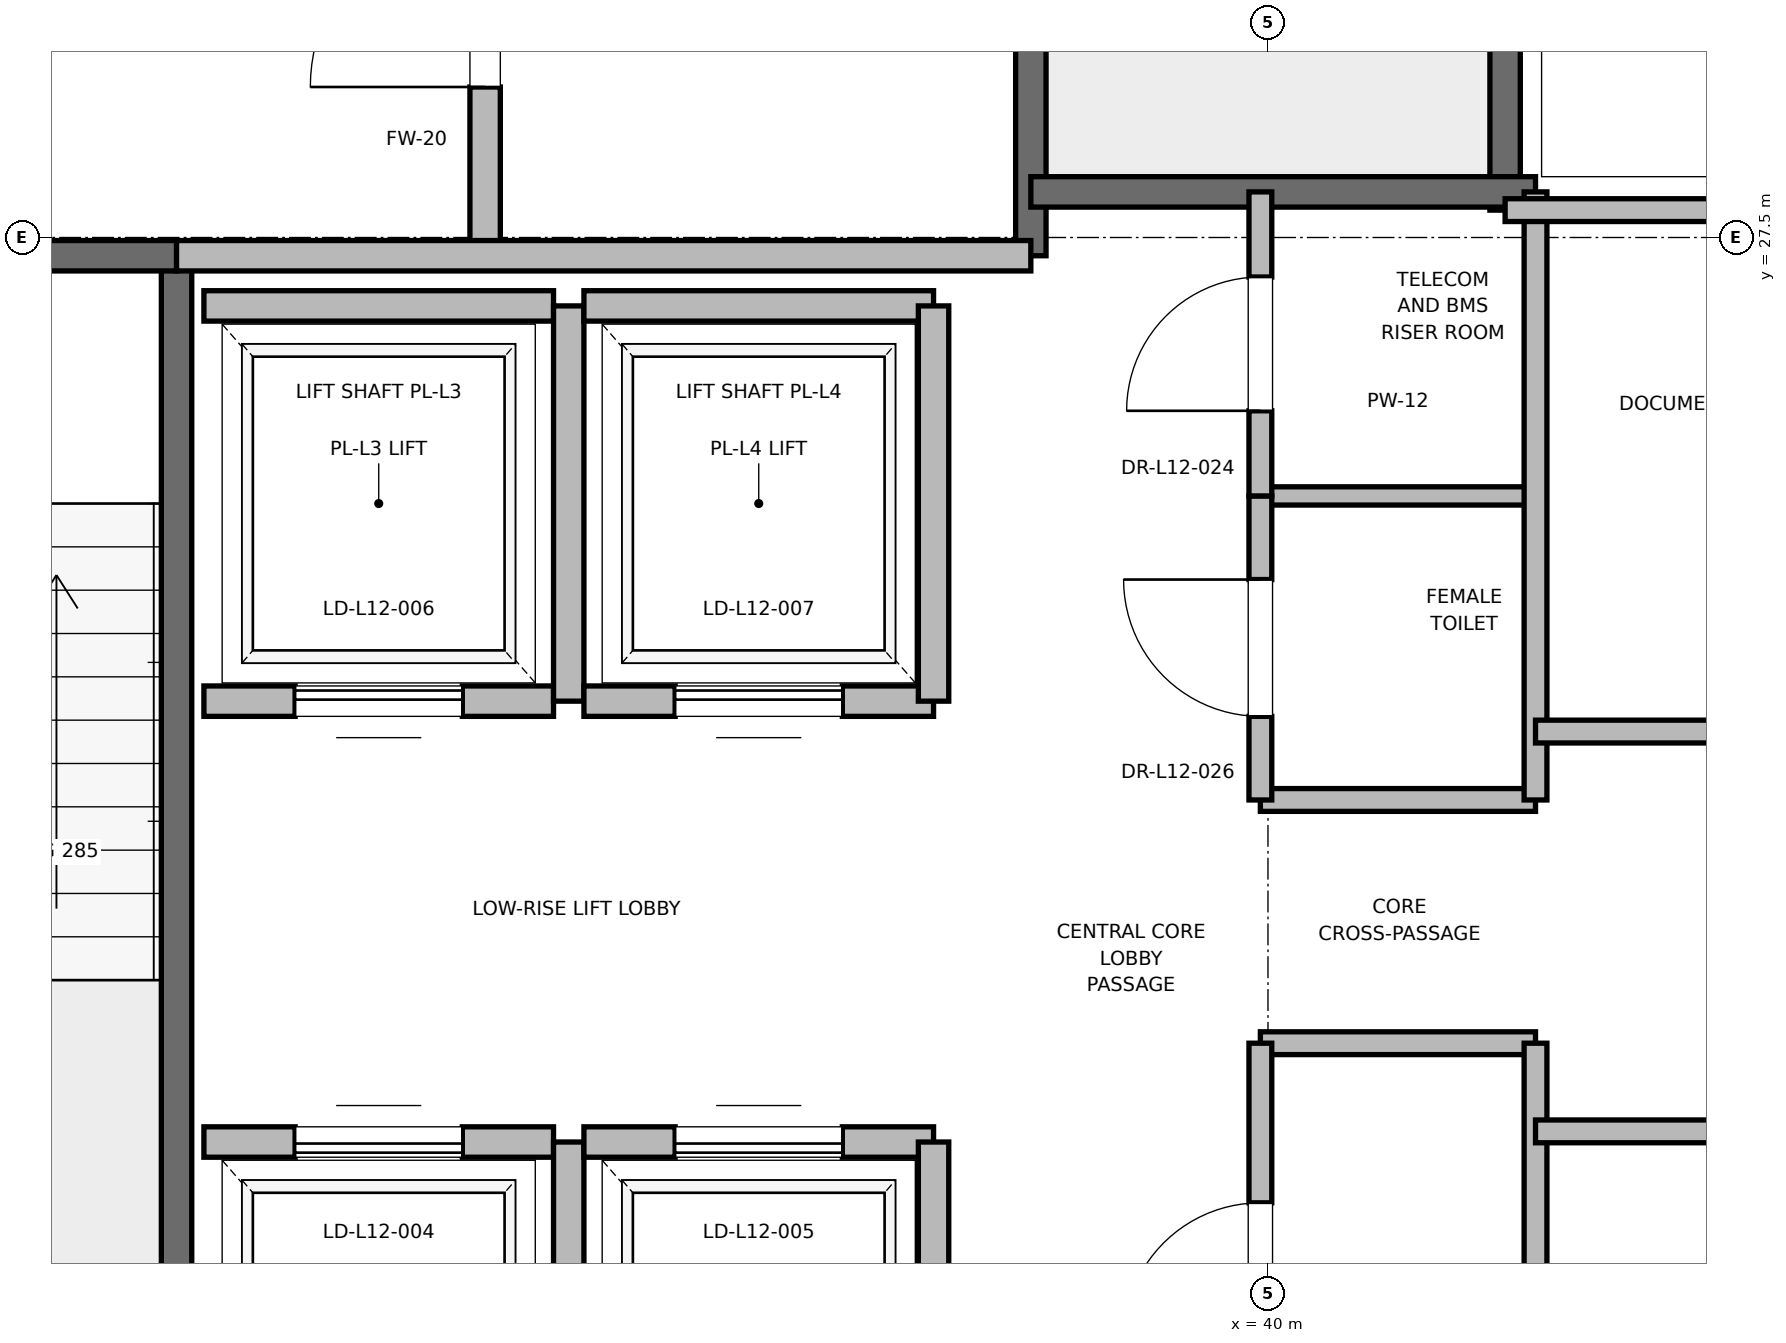
"""IFC4 building model, lengths in metres.
Left out: names, types, materials, properties, quantities, classifications, styles, units other than length and angle.
Written with IfcOpenShell. Run it as: python <this file> out.ifc"""

import sys

from ifc_helpers import new_model, si_unit, direction, frame, frame_2d, origin, place, context, subcontext, project, spatial, rectangle, extrude, element, fill, save


model = new_model("IFC4")
c1 = context("Model", 3, precision=1e-05, world=origin(), true_north=direction((0.0, 1.0)))
c2 = subcontext(c1, "Body", "Model", "MODEL_VIEW")
j1 = project(units=[si_unit("LENGTHUNIT", "METRE"), si_unit("PLANEANGLEUNIT", "RADIAN")], contexts=[c1])
p1 = place(None, origin())
s1 = spatial("IfcSite", under=j1, at=p1, CompositionType="ELEMENT")
p2 = place(p1, origin())
s2 = spatial("IfcBuilding", under=s1, at=p2, CompositionType="ELEMENT")
p3 = place(p2, frame((0.0, 0.0, 55.6)))
s3 = spatial("IfcBuildingStorey", under=s2, at=p3, CompositionType="ELEMENT", Elevation=55.6)
p4 = place(p3, frame((32.82, 18.6, 0.0), z_axis=(0.0, 0.0, 1.0), x_axis=(0.0, 1.0, 0.0)))
e1 = element("IfcWall", 1, at=p4, inside=s3, PredefinedType="SOLIDWALL", context=c2, shape_type="SweptSolid", body=[
    extrude(rectangle(XDim=8.78, YDim=0.2, at=frame_2d((4.39, 0.0))), origin(), (0.0, 0.0, 1.0), 3.76),
])
p5 = place(p3, frame((29.7, 27.38, 0.0), z_axis=(0.0, 0.0, 1.0), x_axis=(1.0, 0.0, 0.0)))
e2 = element("IfcWall", 2, at=p5, inside=s3, PredefinedType="SOLIDWALL", context=c2, shape_type="SweptSolid", body=[
    extrude(rectangle(XDim=3.12, YDim=0.2, at=frame_2d((1.56, 0.0))), origin(), (0.0, 0.0, 1.0), 3.76),
])
p6 = place(p5, frame((1.01, 0.0, 0.0)))
e3 = element("IfcOpeningElement", 3, at=p6, cuts=e2, PredefinedType="OPENING", context=c2, shape_type="SweptSolid", body=[
    extrude(rectangle(XDim=1.1, YDim=2.15, at=frame_2d((0.55, 1.075))), frame((0.0, 0.1, 0.0), z_axis=(0.0, -1.0, 0.0), x_axis=(1.0, 0.0, 0.0)), (0.0, 0.0, 1.0), 0.2),
])
p7 = place(p3, frame((38.44, 27.38, 0.0), z_axis=(0.0, 0.0, 1.0), x_axis=(0.0, 1.0, 0.0)))
e4 = element("IfcWall", 4, at=p7, inside=s3, PredefinedType="SOLIDWALL", context=c2, shape_type="SweptSolid", body=[
    extrude(rectangle(XDim=8.87, YDim=0.2, at=frame_2d((4.435, 0.0))), origin(), (0.0, 0.0, 1.0), 3.76),
])
p8 = place(p3, frame((41.56, 27.68, 0.0), z_axis=(0.0, 0.0, 1.0), x_axis=(0.0, 1.0, 0.0)))
e5 = element("IfcWall", 5, at=p8, inside=s3, PredefinedType="SOLIDWALL", context=c2, shape_type="SweptSolid", body=[
    extrude(rectangle(XDim=8.57, YDim=0.2, at=frame_2d((4.285, 0.0))), origin(), (0.0, 0.0, 1.0), 3.76),
])
p9 = place(p3, frame((38.44, 27.8, 0.0), z_axis=(0.0, 0.0, 1.0), x_axis=(1.0, 0.0, 0.0)))
e6 = element("IfcWall", 6, at=p9, inside=s3, PredefinedType="SOLIDWALL", context=c2, shape_type="SweptSolid", body=[
    extrude(rectangle(XDim=3.32, YDim=0.2, at=frame_2d((1.66, 0.0))), origin(), (0.0, 0.0, 1.0), 3.76),
])
p10 = place(p3, frame((34.85, 27.38, 0.0), z_axis=(0.0, 0.0, 1.0), x_axis=(0.0, 1.0, 0.0)))
e7 = element("IfcWall", 7, at=p10, inside=s3, PredefinedType="PARTITIONING", context=c2, shape_type="SweptSolid", body=[
    extrude(rectangle(XDim=3.37, YDim=0.2, at=frame_2d((1.685, 0.0))), origin(), (0.0, 0.0, 1.0), 3.76),
])
p11 = place(p10, frame((1.11, 0.0, 0.0)))
e8 = element("IfcOpeningElement", 8, at=p11, cuts=e7, PredefinedType="OPENING", context=c2, shape_type="SweptSolid", body=[
    extrude(rectangle(XDim=1.15, YDim=2.2, at=frame_2d((0.575, 1.1))), frame((0.0, 0.1, 0.0), z_axis=(0.0, -1.0, 0.0), x_axis=(1.0, 0.0, 0.0)), (0.0, 0.0, 1.0), 0.2),
])
p12 = place(p3, frame((32.82, 27.38, 0.0), z_axis=(0.0, 0.0, 1.0), x_axis=(1.0, 0.0, 0.0)))
e9 = element("IfcWall", 9, at=p12, inside=s3, PredefinedType="PARTITIONING", context=c2, shape_type="SweptSolid", body=[
    extrude(rectangle(XDim=5.62, YDim=0.2, at=frame_2d((2.81, 0.0))), origin(), (0.0, 0.0, 1.0), 3.76),
])
p13 = place(p3, frame((35.3, 21.55, 0.0), z_axis=(0.0, 0.0, 1.0), x_axis=(-1.0, 0.0, 0.0)))
e10 = element("IfcWall", 10, at=p13, inside=s3, PredefinedType="SOLIDWALL", context=c2, shape_type="SweptSolid", body=[
    extrude(rectangle(XDim=2.3, YDim=0.2, at=frame_2d((1.15, 0.0))), origin(), (0.0, 0.0, 1.0), 3.76),
])
p14 = place(p13, frame((0.6, 0.0, 0.0)))
e11 = element("IfcOpeningElement", 11, at=p14, cuts=e10, PredefinedType="OPENING", context=c2, shape_type="SweptSolid", body=[
    extrude(rectangle(XDim=1.1, YDim=2.2, at=frame_2d((0.55, 1.1))), frame((0.0, 0.1, 0.0), z_axis=(0.0, -1.0, 0.0), x_axis=(1.0, 0.0, 0.0)), (0.0, 0.0, 1.0), 0.2),
])
p15 = place(p3, frame((35.4, 18.95, 0.0), z_axis=(0.0, 0.0, 1.0), x_axis=(0.0, 1.0, 0.0)))
e12 = element("IfcWall", 12, at=p15, inside=s3, PredefinedType="SOLIDWALL", context=c2, shape_type="SweptSolid", body=[
    extrude(rectangle(XDim=2.6, YDim=0.2, at=frame_2d((1.3, 0.0))), origin(), (0.0, 0.0, 1.0), 3.76),
])
p16 = place(p3, frame((37.8, 21.55, 0.0), z_axis=(0.0, 0.0, 1.0), x_axis=(-1.0, 0.0, 0.0)))
e13 = element("IfcWall", 13, at=p16, inside=s3, PredefinedType="SOLIDWALL", context=c2, shape_type="SweptSolid", body=[
    extrude(rectangle(XDim=2.3, YDim=0.2, at=frame_2d((1.15, 0.0))), origin(), (0.0, 0.0, 1.0), 3.76),
])
p17 = place(p16, frame((0.6, 0.0, 0.0)))
e14 = element("IfcOpeningElement", 14, at=p17, cuts=e13, PredefinedType="OPENING", context=c2, shape_type="SweptSolid", body=[
    extrude(rectangle(XDim=1.1, YDim=2.2, at=frame_2d((0.55, 1.1))), frame((0.0, 0.1, 0.0), z_axis=(0.0, -1.0, 0.0), x_axis=(1.0, 0.0, 0.0)), (0.0, 0.0, 1.0), 0.2),
])
p18 = place(p3, frame((37.8, 18.95, 0.0), z_axis=(0.0, 0.0, 1.0), x_axis=(0.0, 1.0, 0.0)))
e15 = element("IfcWall", 15, at=p18, inside=s3, PredefinedType="SOLIDWALL", context=c2, shape_type="SweptSolid", body=[
    extrude(rectangle(XDim=2.6, YDim=0.2, at=frame_2d((1.3, 0.0))), origin(), (0.0, 0.0, 1.0), 2.54),
])
p19 = place(p3, frame((33.0, 24.45, 0.0), z_axis=(0.0, 0.0, 1.0), x_axis=(1.0, 0.0, 0.0)))
e16 = element("IfcWall", 16, at=p19, inside=s3, PredefinedType="SOLIDWALL", context=c2, shape_type="SweptSolid", body=[
    extrude(rectangle(XDim=2.3, YDim=0.2, at=frame_2d((1.15, 0.0))), origin(), (0.0, 0.0, 1.0), 3.76),
])
p20 = place(p19, frame((0.6, 0.0, 0.0)))
e17 = element("IfcOpeningElement", 17, at=p20, cuts=e16, PredefinedType="OPENING", context=c2, shape_type="SweptSolid", body=[
    extrude(rectangle(XDim=1.1, YDim=2.2, at=frame_2d((0.55, 1.1))), frame((0.0, 0.1, 0.0), z_axis=(0.0, -1.0, 0.0), x_axis=(1.0, 0.0, 0.0)), (0.0, 0.0, 1.0), 0.2),
])
p21 = place(p3, frame((35.3, 27.05, 0.0), z_axis=(0.0, 0.0, 1.0), x_axis=(-1.0, 0.0, 0.0)))
e18 = element("IfcWall", 18, at=p21, inside=s3, PredefinedType="SOLIDWALL", context=c2, shape_type="SweptSolid", body=[
    extrude(rectangle(XDim=2.3, YDim=0.2, at=frame_2d((1.15, 0.0))), origin(), (0.0, 0.0, 1.0), 3.76),
])
p22 = place(p3, frame((35.4, 24.45, 0.0), z_axis=(0.0, 0.0, 1.0), x_axis=(0.0, 1.0, 0.0)))
e19 = element("IfcWall", 19, at=p22, inside=s3, PredefinedType="SOLIDWALL", context=c2, shape_type="SweptSolid", body=[
    extrude(rectangle(XDim=2.6, YDim=0.2, at=frame_2d((1.3, 0.0))), origin(), (0.0, 0.0, 1.0), 3.76),
])
p23 = place(p3, frame((35.5, 24.45, 0.0), z_axis=(0.0, 0.0, 1.0), x_axis=(1.0, 0.0, 0.0)))
e20 = element("IfcWall", 20, at=p23, inside=s3, PredefinedType="SOLIDWALL", context=c2, shape_type="SweptSolid", body=[
    extrude(rectangle(XDim=2.3, YDim=0.2, at=frame_2d((1.15, 0.0))), origin(), (0.0, 0.0, 1.0), 3.76),
])
p24 = place(p23, frame((0.6, 0.0, 0.0)))
e21 = element("IfcOpeningElement", 21, at=p24, cuts=e20, PredefinedType="OPENING", context=c2, shape_type="SweptSolid", body=[
    extrude(rectangle(XDim=1.1, YDim=2.2, at=frame_2d((0.55, 1.1))), frame((0.0, 0.1, 0.0), z_axis=(0.0, -1.0, 0.0), x_axis=(1.0, 0.0, 0.0)), (0.0, 0.0, 1.0), 0.2),
])
p25 = place(p3, frame((37.8, 27.05, 0.0), z_axis=(0.0, 0.0, 1.0), x_axis=(-1.0, 0.0, 0.0)))
e22 = element("IfcWall", 22, at=p25, inside=s3, PredefinedType="SOLIDWALL", context=c2, shape_type="SweptSolid", body=[
    extrude(rectangle(XDim=2.3, YDim=0.2, at=frame_2d((1.15, 0.0))), origin(), (0.0, 0.0, 1.0), 3.76),
])
p26 = place(p3, frame((37.8, 24.45, 0.0), z_axis=(0.0, 0.0, 1.0), x_axis=(0.0, 1.0, 0.0)))
e23 = element("IfcWall", 23, at=p26, inside=s3, PredefinedType="SOLIDWALL", context=c2, shape_type="SweptSolid", body=[
    extrude(rectangle(XDim=2.6, YDim=0.2, at=frame_2d((1.3, 0.0))), origin(), (0.0, 0.0, 1.0), 3.76),
])
for number, where, z_axis, x_axis in (
    (24, (39.95, 22.2, 0.0), (0.0, 0.0, 1.0), (1.0, 0.0, 0.0)),
    (25, (39.95, 23.8, 0.0), (0.0, 0.0, 1.0), (1.0, 0.0, 0.0)),
):
    element("IfcWall", number, at=place(p3, frame(where, z_axis=z_axis, x_axis=x_axis)), inside=s3, PredefinedType="PARTITIONING", context=c2, shape_type="SweptSolid", body=[
        extrude(rectangle(XDim=1.81, YDim=0.15, at=frame_2d((0.905, 0.0))), origin(), (0.0, 0.0, 1.0), 2.85),
    ])
p27 = place(p3, frame((39.95, 25.8, 0.0), z_axis=(0.0, 0.0, 1.0), x_axis=(1.0, 0.0, 0.0)))
e26 = element("IfcWall", 26, at=p27, inside=s3, PredefinedType="PARTITIONING", context=c2, shape_type="SweptSolid", body=[
    extrude(rectangle(XDim=1.81, YDim=0.12, at=frame_2d((0.905, 0.0))), origin(), (0.0, 0.0, 1.0), 2.85),
])
p28 = place(p3, frame((41.76, 18.6, 0.0), z_axis=(0.0, 0.0, 1.0), x_axis=(0.0, 1.0, 0.0)))
e27 = element("IfcWall", 27, at=p28, inside=s3, PredefinedType="PARTITIONING", context=c2, shape_type="SweptSolid", body=[
    extrude(rectangle(XDim=3.6, YDim=0.15, at=frame_2d((1.8, 0.0))), origin(), (0.0, 0.0, 1.0), 2.54),
])
p29 = place(p3, frame((41.76, 23.8, 0.0), z_axis=(0.0, 0.0, 1.0), x_axis=(0.0, 1.0, 0.0)))
e28 = element("IfcWall", 28, at=p29, inside=s3, PredefinedType="PARTITIONING", context=c2, shape_type="SweptSolid", body=[
    extrude(rectangle(XDim=4.0, YDim=0.15, at=frame_2d((2.0, 0.0))), origin(), (0.0, 0.0, 1.0), 2.85),
])
p30 = place(p3, frame((39.95, 19.2, 0.0), z_axis=(0.0, 0.0, 1.0), x_axis=(0.0, 1.0, 0.0)))
e29 = element("IfcWall", 29, at=p30, inside=s3, PredefinedType="PARTITIONING", context=c2, shape_type="SweptSolid", body=[
    extrude(rectangle(XDim=3.0, YDim=0.15, at=frame_2d((1.5, 0.0))), origin(), (0.0, 0.0, 1.0), 2.85),
])
p31 = place(p30, frame((1.05, 0.0, 0.0)))
e30 = element("IfcOpeningElement", 30, at=p31, cuts=e29, PredefinedType="OPENING", context=c2, shape_type="SweptSolid", body=[
    extrude(rectangle(XDim=0.9, YDim=2.1, at=frame_2d((0.45, 1.05))), frame((0.0, 0.075, 0.0), z_axis=(0.0, -1.0, 0.0), x_axis=(1.0, 0.0, 0.0)), (0.0, 0.0, 1.0), 0.15),
])
p32 = place(p3, frame((39.95, 23.8, 0.0), z_axis=(0.0, 0.0, 1.0), x_axis=(0.0, 1.0, 0.0)))
e31 = element("IfcWall", 31, at=p32, inside=s3, PredefinedType="PARTITIONING", context=c2, shape_type="SweptSolid", body=[
    extrude(rectangle(XDim=2.0, YDim=0.15, at=frame_2d((1.0, 0.0))), origin(), (0.0, 0.0, 1.0), 2.85),
])
p33 = place(p32, frame((0.55, 0.0, 0.0)))
e32 = element("IfcOpeningElement", 32, at=p33, cuts=e31, PredefinedType="OPENING", context=c2, shape_type="SweptSolid", body=[
    extrude(rectangle(XDim=0.9, YDim=2.1, at=frame_2d((0.45, 1.05))), frame((0.0, 0.075, 0.0), z_axis=(0.0, -1.0, 0.0), x_axis=(1.0, 0.0, 0.0)), (0.0, 0.0, 1.0), 0.15),
])
p34 = place(p3, frame((39.95, 25.8, 0.0), z_axis=(0.0, 0.0, 1.0), x_axis=(0.0, 1.0, 0.0)))
e33 = element("IfcWall", 33, at=p34, inside=s3, PredefinedType="PARTITIONING", context=c2, shape_type="SweptSolid", body=[
    extrude(rectangle(XDim=2.0, YDim=0.15, at=frame_2d((1.0, 0.0))), origin(), (0.0, 0.0, 1.0), 2.85),
])
p35 = place(p34, frame((0.56, 0.0, 0.0)))
e34 = element("IfcOpeningElement", 34, at=p35, cuts=e33, PredefinedType="OPENING", context=c2, shape_type="SweptSolid", body=[
    extrude(rectangle(XDim=0.88, YDim=2.1, at=frame_2d((0.44, 1.05))), frame((0.0, 0.075, 0.0), z_axis=(0.0, -1.0, 0.0), x_axis=(1.0, 0.0, 0.0)), (0.0, 0.0, 1.0), 0.15),
])
p36 = place(p3, frame((41.56, 27.68, 0.0), z_axis=(0.0, 0.0, 1.0), x_axis=(1.0, 0.0, 0.0)))
e35 = element("IfcWall", 35, at=p36, inside=s3, PredefinedType="PARTITIONING", context=c2, shape_type="SweptSolid", body=[
    extrude(rectangle(XDim=3.59, YDim=0.15, at=frame_2d((1.795, 0.0))), origin(), (0.0, 0.0, 1.0), 2.85),
])
p37 = place(p3, frame((41.76, 21.62, 0.0), z_axis=(0.0, 0.0, 1.0), x_axis=(1.0, 0.0, 0.0)))
e36 = element("IfcWall", 36, at=p37, inside=s3, PredefinedType="PARTITIONING", context=c2, shape_type="SweptSolid", body=[
    extrude(rectangle(XDim=5.98, YDim=0.15, at=frame_2d((2.99, 0.0))), origin(), (0.0, 0.0, 1.0), 2.85),
])
p38 = place(p37, frame((2.49, 0.0, 0.0)))
e37 = element("IfcOpeningElement", 37, at=p38, cuts=e36, PredefinedType="OPENING", context=c2, shape_type="SweptSolid", body=[
    extrude(rectangle(XDim=1.0, YDim=2.15, at=frame_2d((0.5, 1.075))), frame((0.0, 0.075, 0.0), z_axis=(0.0, -1.0, 0.0), x_axis=(1.0, 0.0, 0.0)), (0.0, 0.0, 1.0), 0.15),
])
p39 = place(p3, frame((41.76, 24.25, 0.0), z_axis=(0.0, 0.0, 1.0), x_axis=(1.0, 0.0, 0.0)))
e38 = element("IfcWall", 38, at=p39, inside=s3, PredefinedType="PARTITIONING", context=c2, shape_type="SweptSolid", body=[
    extrude(rectangle(XDim=3.39, YDim=0.15, at=frame_2d((1.695, 0.0))), origin(), (0.0, 0.0, 1.0), 2.85),
])
p40 = place(p39, frame((1.195, 0.0, 0.0)))
e39 = element("IfcOpeningElement", 39, at=p40, cuts=e38, PredefinedType="OPENING", context=c2, shape_type="SweptSolid", body=[
    extrude(rectangle(XDim=1.0, YDim=2.15, at=frame_2d((0.5, 1.075))), frame((0.0, 0.075, 0.0), z_axis=(0.0, -1.0, 0.0), x_axis=(1.0, 0.0, 0.0)), (0.0, 0.0, 1.0), 0.15),
])
p41 = place(p11, origin())
e40 = element("IfcDoor", 40, at=p41, inside=s3, OperationType="SINGLE_SWING_LEFT", PredefinedType="DOOR", context=c2, shape_type="SweptSolid", body=[
    extrude(rectangle(XDim=1.15, YDim=2.2, at=frame_2d((0.575, 1.1))), frame((0.0, 0.025, 0.0), z_axis=(0.0, -1.0, 0.0), x_axis=(1.0, 0.0, 0.0)), (0.0, 0.0, 1.0), 0.05),
])
fill(e8, e40)
p42 = place(p14, origin())
e41 = element("IfcDoor", 41, at=p42, inside=s3, OperationType="SLIDING_TO_RIGHT", PredefinedType="DOOR", context=c2, shape_type="SweptSolid", body=[
    extrude(rectangle(XDim=1.1, YDim=2.2, at=frame_2d((0.55, 1.1))), frame((0.0, 0.025, 0.0), z_axis=(0.0, -1.0, 0.0), x_axis=(1.0, 0.0, 0.0)), (0.0, 0.0, 1.0), 0.05),
])
fill(e11, e41)
p43 = place(p17, origin())
e42 = element("IfcDoor", 42, at=p43, inside=s3, OperationType="SLIDING_TO_RIGHT", PredefinedType="DOOR", context=c2, shape_type="SweptSolid", body=[
    extrude(rectangle(XDim=1.1, YDim=2.2, at=frame_2d((0.55, 1.1))), frame((0.0, 0.025, 0.0), z_axis=(0.0, -1.0, 0.0), x_axis=(1.0, 0.0, 0.0)), (0.0, 0.0, 1.0), 0.05),
])
fill(e14, e42)
p44 = place(p20, origin())
e43 = element("IfcDoor", 43, at=p44, inside=s3, OperationType="SLIDING_TO_RIGHT", PredefinedType="DOOR", context=c2, shape_type="SweptSolid", body=[
    extrude(rectangle(XDim=1.1, YDim=2.2, at=frame_2d((0.55, 1.1))), frame((0.0, 0.025, 0.0), z_axis=(0.0, -1.0, 0.0), x_axis=(1.0, 0.0, 0.0)), (0.0, 0.0, 1.0), 0.05),
])
fill(e17, e43)
p45 = place(p24, origin())
e44 = element("IfcDoor", 44, at=p45, inside=s3, OperationType="SLIDING_TO_RIGHT", PredefinedType="DOOR", context=c2, shape_type="SweptSolid", body=[
    extrude(rectangle(XDim=1.1, YDim=2.2, at=frame_2d((0.55, 1.1))), frame((0.0, 0.025, 0.0), z_axis=(0.0, -1.0, 0.0), x_axis=(1.0, 0.0, 0.0)), (0.0, 0.0, 1.0), 0.05),
])
fill(e21, e44)
p46 = place(p31, origin())
e45 = element("IfcDoor", 45, at=p46, inside=s3, OperationType="SINGLE_SWING_LEFT", PredefinedType="DOOR", context=c2, shape_type="SweptSolid", body=[
    extrude(rectangle(XDim=0.9, YDim=2.1, at=frame_2d((0.45, 1.05))), frame((0.0, 0.025, 0.0), z_axis=(0.0, -1.0, 0.0), x_axis=(1.0, 0.0, 0.0)), (0.0, 0.0, 1.0), 0.05),
])
fill(e30, e45)
p47 = place(p33, origin())
e46 = element("IfcDoor", 46, at=p47, inside=s3, OperationType="SINGLE_SWING_RIGHT", PredefinedType="DOOR", context=c2, shape_type="SweptSolid", body=[
    extrude(rectangle(XDim=0.9, YDim=2.1, at=frame_2d((0.45, 1.05))), frame((0.0, 0.025, 0.0), z_axis=(0.0, -1.0, 0.0), x_axis=(1.0, 0.0, 0.0)), (0.0, 0.0, 1.0), 0.05),
])
fill(e32, e46)
p48 = place(p35, origin())
e47 = element("IfcDoor", 47, at=p48, inside=s3, OperationType="SINGLE_SWING_LEFT", PredefinedType="DOOR", context=c2, shape_type="SweptSolid", body=[
    extrude(rectangle(XDim=0.88, YDim=2.1, at=frame_2d((0.44, 1.05))), frame((0.0, 0.025, 0.0), z_axis=(0.0, -1.0, 0.0), x_axis=(1.0, 0.0, 0.0)), (0.0, 0.0, 1.0), 0.05),
])
fill(e34, e47)
save(model, sys.argv[1])
